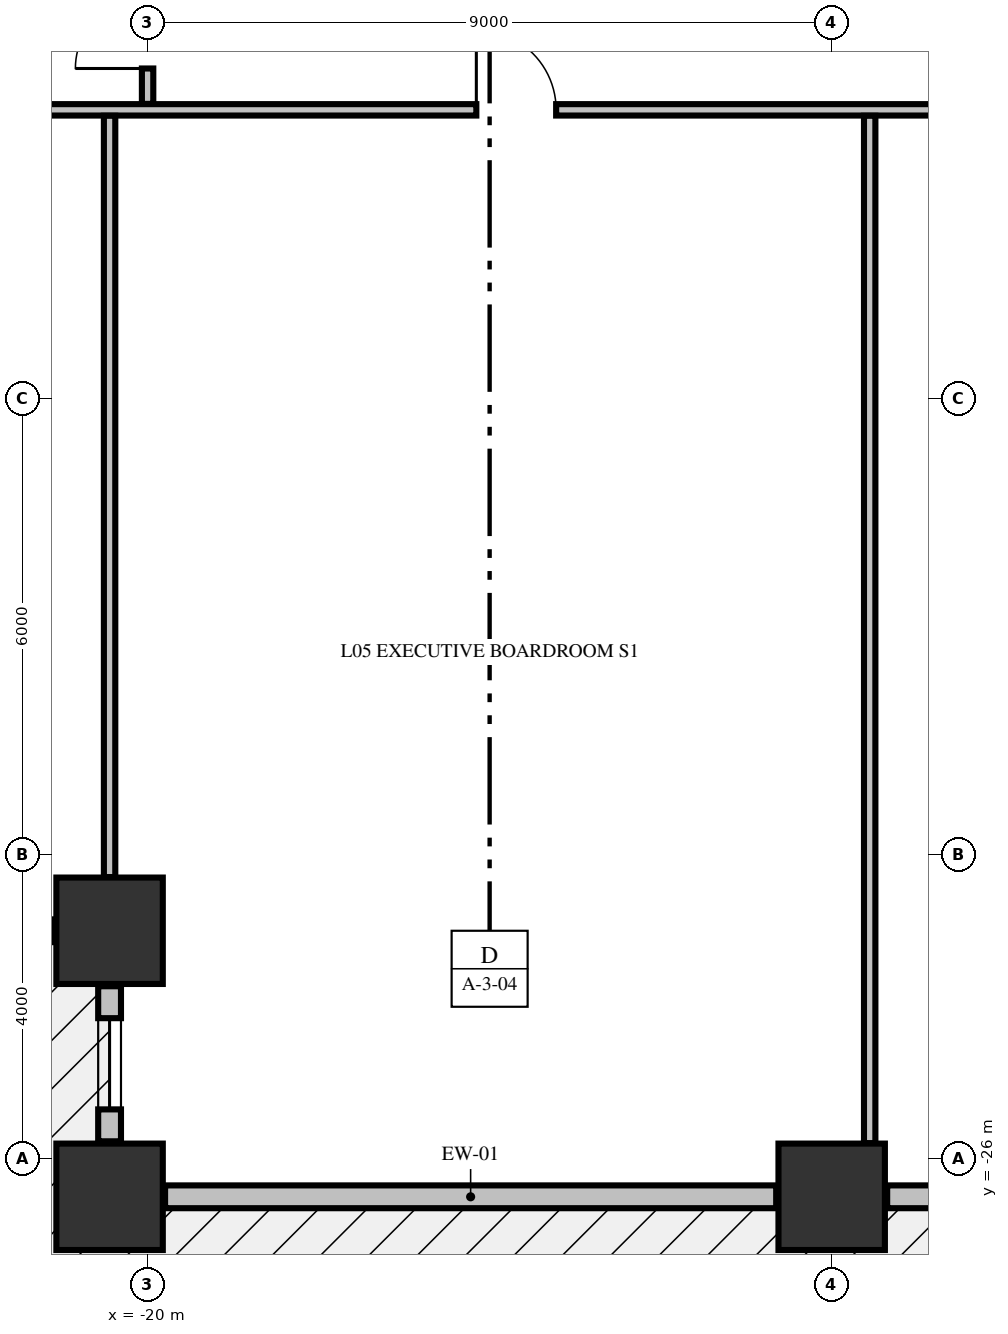
"""IFC4 building model, lengths in metres.
Left out: names, types, materials, properties, quantities, classifications, styles, units other than length and angle.
Written with IfcOpenShell. Run it as: python <this file> out.ifc"""

import sys

from ifc_helpers import new_model, si_unit, direction, frame, frame_2d, origin, origin_2d, place, context, subcontext, project, spatial, rectangle, extrude, element, fill, save


model = new_model("IFC4")
c1 = context("Model", 3, precision=1e-05, world=origin(), true_north=direction((0.0, 1.0)))
c2 = subcontext(c1, "Body", "Model", "MODEL_VIEW")
j1 = project(units=[si_unit("LENGTHUNIT", "METRE"), si_unit("PLANEANGLEUNIT", "RADIAN")], contexts=[c1])
p1 = place(None, origin())
s1 = spatial("IfcSite", under=j1, at=p1, CompositionType="ELEMENT")
p2 = place(p1, origin())
s2 = spatial("IfcBuilding", under=s1, at=p2, CompositionType="ELEMENT")
p3 = place(p2, frame((0.0, 0.0, 27.2)))
s3 = spatial("IfcBuildingStorey", under=s2, at=p3, CompositionType="ELEMENT", Elevation=27.2)
for number, where, z_axis, x_axis in (
    (1, (-20.5, -26.5, -0.45), (0.0, 0.0, 1.0), (1.0, 0.0, 0.0)),
    (2, (-11.0, -26.5, -0.45), (0.0, 0.0, 1.0), (1.0, 0.0, 0.0)),
    (3, (-20.5, -23.0, -0.45), (0.0, 0.0, 1.0), (1.0, 0.0, 0.0)),
):
    element("IfcColumn", number, at=place(p3, frame(where, z_axis=z_axis, x_axis=x_axis)), inside=s3, PredefinedType="COLUMN", context=c2, shape_type="SweptSolid", body=[
        extrude(rectangle(XDim=1.4, YDim=1.4, at=origin_2d()), origin(), (0.0, 0.0, 1.0), 3.77),
    ])
p4 = place(p3, frame((-23.27, -23.0, 0.0), z_axis=(0.0, 0.0, 1.0), x_axis=(1.0, 0.0, 0.0)))
e4 = element("IfcWall", 4, at=p4, inside=s3, PredefinedType="STANDARD", context=c2, shape_type="SweptSolid", body=[
    extrude(rectangle(XDim=2.04, YDim=0.3, at=frame_2d((1.02, 0.0))), origin(), (0.0, 0.0, 1.0), 2.712),
])
p5 = place(p4, frame((0.42, 0.0, 0.82)))
e5 = element("IfcOpeningElement", 5, at=p5, cuts=e4, PredefinedType="OPENING", context=c2, shape_type="SweptSolid", body=[
    extrude(rectangle(XDim=1.2, YDim=1.65, at=frame_2d((0.6, 0.825))), frame((0.0, 0.16, 0.0), z_axis=(0.0, -1.0, 0.0), x_axis=(1.0, 0.0, 0.0)), (0.0, 0.0, 1.0), 0.32),
])
p6 = place(p3, frame((-20.5, -23.73, 0.0), z_axis=(0.0, 0.0, 1.0), x_axis=(0.0, -1.0, 0.0)))
e6 = element("IfcWall", 6, at=p6, inside=s3, PredefinedType="STANDARD", context=c2, shape_type="SweptSolid", body=[
    extrude(rectangle(XDim=2.04, YDim=0.3, at=frame_2d((1.02, 0.0))), origin(), (0.0, 0.0, 1.0), 2.712),
])
p7 = place(p6, frame((0.42, 0.0, 0.82)))
e7 = element("IfcOpeningElement", 7, at=p7, cuts=e6, PredefinedType="OPENING", context=c2, shape_type="SweptSolid", body=[
    extrude(rectangle(XDim=1.2, YDim=1.65, at=frame_2d((0.6, 0.825))), frame((0.0, 0.16, 0.0), z_axis=(0.0, -1.0, 0.0), x_axis=(1.0, 0.0, 0.0)), (0.0, 0.0, 1.0), 0.32),
])
p8 = place(p3, frame((-19.77, -26.5, 0.0), z_axis=(0.0, 0.0, 1.0), x_axis=(1.0, 0.0, 0.0)))
e8 = element("IfcWall", 8, at=p8, inside=s3, PredefinedType="STANDARD", context=c2, shape_type="SweptSolid", body=[
    extrude(rectangle(XDim=8.04, YDim=0.3, at=frame_2d((4.02, 0.0))), origin(), (0.0, 0.0, 1.0), 2.712),
])
p9 = place(p3, frame((-10.27, -26.5, 0.0), z_axis=(0.0, 0.0, 1.0), x_axis=(1.0, 0.0, 0.0)))
e9 = element("IfcWall", 9, at=p9, inside=s3, PredefinedType="STANDARD", context=c2, shape_type="SweptSolid", body=[
    extrude(rectangle(XDim=9.54, YDim=0.3, at=frame_2d((4.77, 0.0))), origin(), (0.0, 0.0, 1.0), 2.712),
])
p10 = place(p9, frame((1.485, 0.0, 0.78)))
e10 = element("IfcOpeningElement", 10, at=p10, cuts=e9, PredefinedType="OPENING", context=c2, shape_type="SweptSolid", body=[
    extrude(rectangle(XDim=1.8, YDim=1.72, at=frame_2d((0.9, 0.86))), frame((0.0, 0.16, 0.0), z_axis=(0.0, -1.0, 0.0), x_axis=(1.0, 0.0, 0.0)), (0.0, 0.0, 1.0), 0.32),
])
p11 = place(p9, frame((3.87, 0.0, 0.78)))
e11 = element("IfcOpeningElement", 11, at=p11, cuts=e9, PredefinedType="OPENING", context=c2, shape_type="SweptSolid", body=[
    extrude(rectangle(XDim=1.8, YDim=1.72, at=frame_2d((0.9, 0.86))), frame((0.0, 0.16, 0.0), z_axis=(0.0, -1.0, 0.0), x_axis=(1.0, 0.0, 0.0)), (0.0, 0.0, 1.0), 0.32),
])
p12 = place(p9, frame((6.255, 0.0, 0.78)))
e12 = element("IfcOpeningElement", 12, at=p12, cuts=e9, PredefinedType="OPENING", context=c2, shape_type="SweptSolid", body=[
    extrude(rectangle(XDim=1.8, YDim=1.72, at=frame_2d((0.9, 0.86))), frame((0.0, 0.16, 0.0), z_axis=(0.0, -1.0, 0.0), x_axis=(1.0, 0.0, 0.0)), (0.0, 0.0, 1.0), 0.32),
])
p13 = place(p3, frame((-23.835, -12.2, 0.0), z_axis=(0.0, 0.0, 1.0), x_axis=(1.0, 0.0, 0.0)))
e13 = element("IfcWall", 13, at=p13, inside=s3, PredefinedType="PARTITIONING", context=c2, shape_type="SweptSolid", body=[
    extrude(rectangle(XDim=52.67, YDim=0.15, at=frame_2d((26.335, 0.0))), origin(), (0.0, 0.0, 1.0), 3.32),
])
p14 = place(p13, frame((8.16, 0.0, 0.0)))
e14 = element("IfcOpeningElement", 14, at=p14, cuts=e13, PredefinedType="OPENING", context=c2, shape_type="SweptSolid", body=[
    extrude(rectangle(XDim=1.05, YDim=2.15, at=frame_2d((0.525, 1.075))), frame((0.0, 0.085, 0.0), z_axis=(0.0, -1.0, 0.0), x_axis=(1.0, 0.0, 0.0)), (0.0, 0.0, 1.0), 0.17),
])
p15 = place(p13, frame((18.31, 0.0, 0.0)))
e15 = element("IfcOpeningElement", 15, at=p15, cuts=e13, PredefinedType="OPENING", context=c2, shape_type="SweptSolid", body=[
    extrude(rectangle(XDim=1.05, YDim=2.15, at=frame_2d((0.525, 1.075))), frame((0.0, 0.085, 0.0), z_axis=(0.0, -1.0, 0.0), x_axis=(1.0, 0.0, 0.0)), (0.0, 0.0, 1.0), 0.17),
])
p16 = place(p13, frame((41.46, 0.0, 0.0)))
e16 = element("IfcOpeningElement", 16, at=p16, cuts=e13, PredefinedType="OPENING", context=c2, shape_type="SweptSolid", body=[
    extrude(rectangle(XDim=1.05, YDim=2.15, at=frame_2d((0.525, 1.075))), frame((0.0, 0.085, 0.0), z_axis=(0.0, -1.0, 0.0), x_axis=(1.0, 0.0, 0.0)), (0.0, 0.0, 1.0), 0.17),
])
p17 = place(p3, frame((-20.5, -22.294, 0.0), z_axis=(0.0, 0.0, 1.0), x_axis=(0.0, 1.0, 0.0)))
e17 = element("IfcWall", 17, at=p17, inside=s3, PredefinedType="PARTITIONING", context=c2, shape_type="SweptSolid", body=[
    extrude(rectangle(XDim=10.016, YDim=0.15, at=frame_2d((5.008, 0.0))), origin(), (0.0, 0.0, 1.0), 3.32),
])
p18 = place(p3, frame((-20.0, -12.122, 0.0), z_axis=(0.0, 0.0, 1.0), x_axis=(0.0, 1.0, 0.0)))
e18 = element("IfcWall", 18, at=p18, inside=s3, PredefinedType="PARTITIONING", context=c2, shape_type="SweptSolid", body=[
    extrude(rectangle(XDim=1.566, YDim=0.15, at=frame_2d((0.783, 0.0))), origin(), (0.0, 0.0, 1.0), 3.32),
])
p19 = place(p18, frame((0.466, 0.0, 0.0)))
e19 = element("IfcOpeningElement", 19, at=p19, cuts=e18, PredefinedType="OPENING", context=c2, shape_type="SweptSolid", body=[
    extrude(rectangle(XDim=0.95, YDim=2.15, at=frame_2d((0.475, 1.075))), frame((0.0, 0.085, 0.0), z_axis=(0.0, -1.0, 0.0), x_axis=(1.0, 0.0, 0.0)), (0.0, 0.0, 1.0), 0.17),
])
p20 = place(p3, frame((-10.5, -25.794, 0.0), z_axis=(0.0, 0.0, 1.0), x_axis=(0.0, 1.0, 0.0)))
e20 = element("IfcWall", 20, at=p20, inside=s3, PredefinedType="PARTITIONING", context=c2, shape_type="SweptSolid", body=[
    extrude(rectangle(XDim=13.516, YDim=0.15, at=frame_2d((6.758, 0.0))), origin(), (0.0, 0.0, 1.0), 3.32),
])
p21 = place(p7, origin())
e21 = element("IfcWindow", 21, at=p21, inside=s3, PartitioningType="SINGLE_PANEL", PredefinedType="WINDOW", context=c2, shape_type="SweptSolid", body=[
    extrude(rectangle(XDim=1.2, YDim=1.65, at=frame_2d((0.6, 0.825))), frame((0.0, 0.03, 0.0), z_axis=(0.0, -1.0, 0.0), x_axis=(1.0, 0.0, 0.0)), (0.0, 0.0, 1.0), 0.06),
])
fill(e7, e21)
p22 = place(p14, origin())
e22 = element("IfcDoor", 22, at=p22, inside=s3, OperationType="SINGLE_SWING_LEFT", PredefinedType="DOOR", context=c2, shape_type="SweptSolid", body=[
    extrude(rectangle(XDim=1.05, YDim=2.15, at=frame_2d((0.525, 1.075))), frame((0.0, 0.025, 0.0), z_axis=(0.0, -1.0, 0.0), x_axis=(1.0, 0.0, 0.0)), (0.0, 0.0, 1.0), 0.05),
])
fill(e14, e22)
p23 = place(p19, origin())
e23 = element("IfcDoor", 23, at=p23, inside=s3, OperationType="SINGLE_SWING_LEFT", PredefinedType="DOOR", context=c2, shape_type="SweptSolid", body=[
    extrude(rectangle(XDim=0.95, YDim=2.15, at=frame_2d((0.475, 1.075))), frame((0.0, 0.025, 0.0), z_axis=(0.0, -1.0, 0.0), x_axis=(1.0, 0.0, 0.0)), (0.0, 0.0, 1.0), 0.05),
])
fill(e19, e23)
save(model, sys.argv[1])
